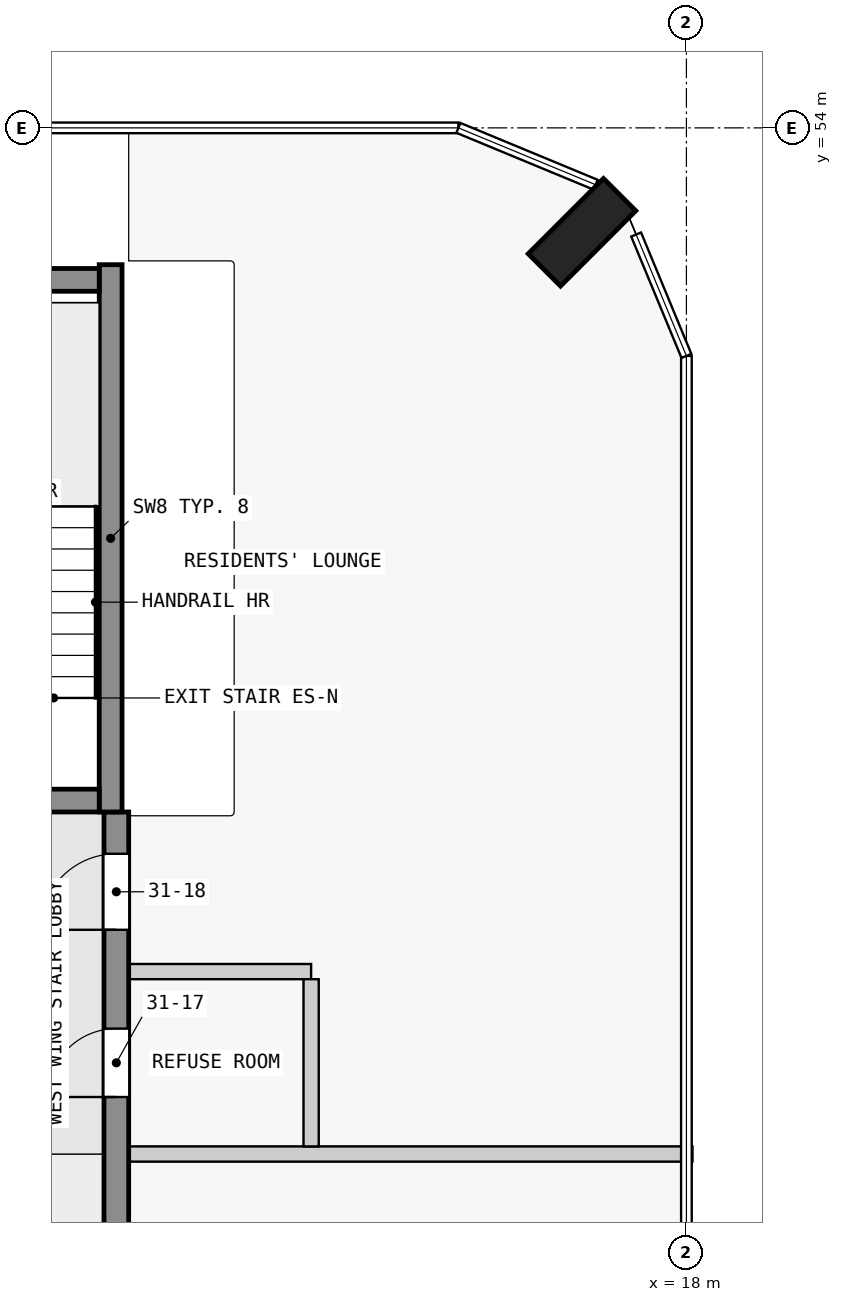
"""IFC4 building model, lengths in metres.
Left out: names, types, materials, properties, quantities, classifications, styles, units other than length and angle.
Written with IfcOpenShell. Run it as: python <this file> out.ifc"""

import sys

from ifc_helpers import new_model, si_unit, direction, frame, frame_2d, origin, origin_2d, place, context, subcontext, project, spatial, rectangle, extrude, element, fill, save


model = new_model("IFC4")
c1 = context("Model", 3, precision=1e-05, world=origin(), true_north=direction((0.0, 1.0)))
c2 = subcontext(c1, "Body", "Model", "MODEL_VIEW")
j1 = project(units=[si_unit("LENGTHUNIT", "METRE"), si_unit("PLANEANGLEUNIT", "RADIAN")], contexts=[c1])
p1 = place(None, origin())
s1 = spatial("IfcSite", under=j1, at=p1, CompositionType="ELEMENT")
p2 = place(p1, origin())
s2 = spatial("IfcBuilding", under=s1, at=p2, CompositionType="ELEMENT")
p3 = place(p2, frame((0.0, 0.0, 120.3)))
s3 = spatial("IfcBuildingStorey", under=s2, at=p3, CompositionType="ELEMENT", Elevation=120.3)
p4 = place(p3, frame((16.626, 52.626, 0.0), z_axis=(0.0, 0.0, 1.0), x_axis=(-0.707106781187, 0.707106781187, 0.0)))
e1 = element("IfcColumn", 1, at=p4, inside=s3, PredefinedType="COLUMN", context=c2, shape_type="SweptSolid", body=[
    extrude(rectangle(XDim=0.6, YDim=1.4, at=origin_2d()), origin(), (0.0, 0.0, 1.0), 3.5),
])
p5 = place(p3, frame((7.725, 45.15, 0.0), z_axis=(0.0, 0.0, 1.0), x_axis=(1.0, 0.0, 0.0)))
e2 = element("IfcWall", 2, at=p5, inside=s3, PredefinedType="SHEAR", context=c2, shape_type="SweptSolid", body=[
    extrude(rectangle(XDim=2.55, YDim=0.3, at=frame_2d((1.275, 0.0))), origin(), (0.0, 0.0, 1.0), 3.5),
])
p6 = place(p5, frame((0.725, 0.0, 0.0)))
e3 = element("IfcOpeningElement", 3, at=p6, cuts=e2, PredefinedType="OPENING", context=c2, shape_type="SweptSolid", body=[
    extrude(rectangle(XDim=1.1, YDim=2.1, at=frame_2d((0.55, 1.05))), frame((0.0, 0.16, 0.0), z_axis=(0.0, -1.0, 0.0), x_axis=(1.0, 0.0, 0.0)), (0.0, 0.0, 1.0), 0.32),
])
p7 = place(p3, frame((7.725, 52.0, 0.0), z_axis=(0.0, 0.0, 1.0), x_axis=(1.0, 0.0, 0.0)))
e4 = element("IfcWall", 4, at=p7, inside=s3, PredefinedType="SHEAR", context=c2, shape_type="SweptSolid", body=[
    extrude(rectangle(XDim=2.55, YDim=0.3, at=frame_2d((1.275, 0.0))), origin(), (0.0, 0.0, 1.0), 3.5),
])
p8 = place(p3, frame((10.425, 45.0, 0.0), z_axis=(0.0, 0.0, 1.0), x_axis=(0.0, 1.0, 0.0)))
e5 = element("IfcWall", 5, at=p8, inside=s3, PredefinedType="SHEAR", context=c2, shape_type="SweptSolid", body=[
    extrude(rectangle(XDim=7.2, YDim=0.3, at=frame_2d((3.6, 0.0))), origin(), (0.0, 0.0, 1.0), 3.5),
])
p9 = place(p3, frame((10.5, 18.0, 0.0), z_axis=(0.0, 0.0, 1.0), x_axis=(0.0, 1.0, 0.0)))
e6 = element("IfcWall", 6, at=p9, inside=s3, PredefinedType="SHEAR", context=c2, shape_type="SweptSolid", body=[
    extrude(rectangle(XDim=27.0, YDim=0.325, at=frame_2d((13.5, 0.0))), origin(), (0.0, 0.0, 1.0), 3.2),
])
p10 = place(p9, frame((1.75, 0.0, 0.0)))
e7 = element("IfcOpeningElement", 7, at=p10, cuts=e6, PredefinedType="OPENING", context=c2, shape_type="SweptSolid", body=[
    extrude(rectangle(XDim=1.0, YDim=2.1, at=frame_2d((0.5, 1.05))), frame((0.0, 0.172, 0.0), z_axis=(0.0, -1.0, 0.0), x_axis=(1.0, 0.0, 0.0)), (0.0, 0.0, 1.0), 0.345),
])
p11 = place(p9, frame((6.25, 0.0, 0.0)))
e8 = element("IfcOpeningElement", 8, at=p11, cuts=e6, PredefinedType="OPENING", context=c2, shape_type="SweptSolid", body=[
    extrude(rectangle(XDim=1.0, YDim=2.1, at=frame_2d((0.5, 1.05))), frame((0.0, 0.172, 0.0), z_axis=(0.0, -1.0, 0.0), x_axis=(1.0, 0.0, 0.0)), (0.0, 0.0, 1.0), 0.345),
])
p12 = place(p9, frame((13.05, 0.0, 0.0)))
e9 = element("IfcOpeningElement", 9, at=p12, cuts=e6, PredefinedType="OPENING", context=c2, shape_type="SweptSolid", body=[
    extrude(rectangle(XDim=1.0, YDim=2.1, at=frame_2d((0.5, 1.05))), frame((0.0, 0.172, 0.0), z_axis=(0.0, -1.0, 0.0), x_axis=(1.0, 0.0, 0.0)), (0.0, 0.0, 1.0), 0.345),
])
p13 = place(p9, frame((19.75, 0.0, 0.0)))
e10 = element("IfcOpeningElement", 10, at=p13, cuts=e6, PredefinedType="OPENING", context=c2, shape_type="SweptSolid", body=[
    extrude(rectangle(XDim=1.0, YDim=2.1, at=frame_2d((0.5, 1.05))), frame((0.0, 0.172, 0.0), z_axis=(0.0, -1.0, 0.0), x_axis=(1.0, 0.0, 0.0)), (0.0, 0.0, 1.0), 0.345),
])
p14 = place(p9, frame((23.25, 0.0, 0.0)))
e11 = element("IfcOpeningElement", 11, at=p14, cuts=e6, PredefinedType="OPENING", context=c2, shape_type="SweptSolid", body=[
    extrude(rectangle(XDim=0.9, YDim=2.1, at=frame_2d((0.45, 1.05))), frame((0.0, 0.172, 0.0), z_axis=(0.0, -1.0, 0.0), x_axis=(1.0, 0.0, 0.0)), (0.0, 0.0, 1.0), 0.345),
])
p15 = place(p9, frame((25.45, 0.0, 0.0)))
e12 = element("IfcOpeningElement", 12, at=p15, cuts=e6, PredefinedType="OPENING", context=c2, shape_type="SweptSolid", body=[
    extrude(rectangle(XDim=1.0, YDim=2.1, at=frame_2d((0.5, 1.05))), frame((0.0, 0.172, 0.0), z_axis=(0.0, -1.0, 0.0), x_axis=(1.0, 0.0, 0.0)), (0.0, 0.0, 1.0), 0.345),
])
p16 = place(p3, frame((18.08, 40.5, 0.0), z_axis=(0.0, 0.0, 1.0), x_axis=(-1.0, 0.0, 0.0)))
e13 = element("IfcWall", 13, at=p16, inside=s3, PredefinedType="PARTITIONING", context=c2, shape_type="SweptSolid", body=[
    extrude(rectangle(XDim=7.417, YDim=0.2, at=frame_2d((3.709, 0.0))), origin(), (0.0, 0.0, 1.0), 3.2),
])
p17 = place(p3, frame((13.062, 42.9, 0.0), z_axis=(0.0, 0.0, 1.0), x_axis=(-1.0, 0.0, 0.0)))
e14 = element("IfcWall", 14, at=p17, inside=s3, PredefinedType="PARTITIONING", context=c2, shape_type="SweptSolid", body=[
    extrude(rectangle(XDim=2.4, YDim=0.2, at=frame_2d((1.2, 0.0))), origin(), (0.0, 0.0, 1.0), 3.2),
])
p18 = place(p3, frame((13.062, 40.6, 0.0), z_axis=(0.0, 0.0, 1.0), x_axis=(0.0, 1.0, 0.0)))
e15 = element("IfcWall", 15, at=p18, inside=s3, PredefinedType="PARTITIONING", context=c2, shape_type="SweptSolid", body=[
    extrude(rectangle(XDim=2.2, YDim=0.2, at=frame_2d((1.1, 0.0))), origin(), (0.0, 0.0, 1.0), 3.2),
])
p19 = place(p14, origin())
e16 = element("IfcDoor", 16, at=p19, inside=s3, OperationType="SINGLE_SWING_RIGHT", PredefinedType="DOOR", context=c2, shape_type="SweptSolid", body=[
    extrude(rectangle(XDim=0.9, YDim=2.1, at=frame_2d((0.45, 1.05))), frame((0.0, 0.025, 0.0), z_axis=(0.0, -1.0, 0.0), x_axis=(1.0, 0.0, 0.0)), (0.0, 0.0, 1.0), 0.05),
])
fill(e11, e16)
p20 = place(p15, origin())
e17 = element("IfcDoor", 17, at=p20, inside=s3, OperationType="SINGLE_SWING_RIGHT", PredefinedType="DOOR", context=c2, shape_type="SweptSolid", body=[
    extrude(rectangle(XDim=1.0, YDim=2.1, at=frame_2d((0.5, 1.05))), frame((0.0, 0.025, 0.0), z_axis=(0.0, -1.0, 0.0), x_axis=(1.0, 0.0, 0.0)), (0.0, 0.0, 1.0), 0.05),
])
fill(e12, e17)
save(model, sys.argv[1])
